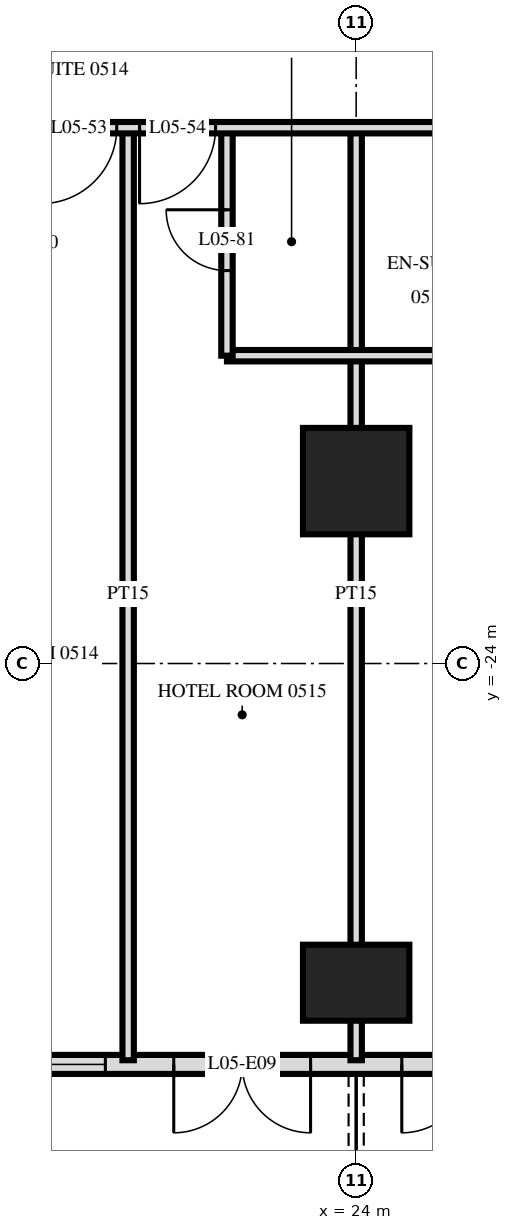
"""IFC4 building model, lengths in metres.
Left out: names, types, materials, properties, quantities, classifications, styles, units other than length and angle.
Written with IfcOpenShell. Run it as: python <this file> out.ifc"""

import sys

from ifc_helpers import new_model, si_unit, direction, frame, frame_2d, origin, origin_2d, place, context, subcontext, project, spatial, rectangle, extrude, element, fill, save


model = new_model("IFC4")
c1 = context("Model", 3, precision=1e-05, world=origin(), true_north=direction((0.0, 1.0)))
c2 = subcontext(c1, "Body", "Model", "MODEL_VIEW")
j1 = project(units=[si_unit("LENGTHUNIT", "METRE"), si_unit("PLANEANGLEUNIT", "RADIAN")], contexts=[c1])
p1 = place(None, origin())
s1 = spatial("IfcSite", under=j1, at=p1, CompositionType="ELEMENT")
p2 = place(p1, origin())
s2 = spatial("IfcBuilding", under=s1, at=p2, CompositionType="ELEMENT")
p3 = place(p2, frame((0.0, 0.0, 27.6)))
s3 = spatial("IfcBuildingStorey", under=s2, at=p3, CompositionType="ELEMENT", Elevation=27.6)
p4 = place(p3, frame((24.0, -28.2, 0.0), z_axis=(0.0, 0.0, 1.0), x_axis=(1.0, 0.0, 0.0)))
e1 = element("IfcColumn", 1, at=p4, inside=s3, PredefinedType="COLUMN", context=c2, shape_type="SweptSolid", body=[
    extrude(rectangle(XDim=1.4, YDim=1.0, at=origin_2d()), origin(), (0.0, 0.0, 1.0), 3.6),
])
p5 = place(p3, frame((24.0, -21.6, 0.0), z_axis=(0.0, 0.0, 1.0), x_axis=(1.0, 0.0, 0.0)))
e2 = element("IfcColumn", 2, at=p5, inside=s3, PredefinedType="COLUMN", context=c2, shape_type="SweptSolid", body=[
    extrude(rectangle(XDim=1.4, YDim=1.4, at=origin_2d()), origin(), (0.0, 0.0, 1.0), 3.6),
])
p6 = place(p3, frame((-28.775, -29.275, 0.0), z_axis=(0.0, 0.0, 1.0), x_axis=(1.0, 0.0, 0.0)))
e3 = element("IfcWall", 3, at=p6, inside=s3, PredefinedType="SOLIDWALL", context=c2, shape_type="SweptSolid", body=[
    extrude(rectangle(XDim=57.551, YDim=0.25, at=frame_2d((28.775, 0.0))), origin(), (0.0, 0.0, 1.0), 3.32),
])
p7 = place(p6, frame((0.575, 0.0, 0.0)))
e4 = element("IfcOpeningElement", 4, at=p7, cuts=e3, PredefinedType="OPENING", context=c2, shape_type="SweptSolid", body=[
    extrude(rectangle(XDim=1.8, YDim=2.4, at=frame_2d((0.9, 1.2))), frame((0.0, 0.135, 0.0), z_axis=(0.0, -1.0, 0.0), x_axis=(1.0, 0.0, 0.0)), (0.0, 0.0, 1.0), 0.27),
])
p8 = place(p6, frame((5.375, 0.0, 0.0)))
e5 = element("IfcOpeningElement", 5, at=p8, cuts=e3, PredefinedType="OPENING", context=c2, shape_type="SweptSolid", body=[
    extrude(rectangle(XDim=1.8, YDim=2.4, at=frame_2d((0.9, 1.2))), frame((0.0, 0.135, 0.0), z_axis=(0.0, -1.0, 0.0), x_axis=(1.0, 0.0, 0.0)), (0.0, 0.0, 1.0), 0.27),
])
p9 = place(p6, frame((8.075, 0.0, 0.3)))
e6 = element("IfcOpeningElement", 6, at=p9, cuts=e3, PredefinedType="OPENING", context=c2, shape_type="SweptSolid", body=[
    extrude(rectangle(XDim=2.4, YDim=2.1, at=frame_2d((1.2, 1.05))), frame((0.0, 0.135, 0.0), z_axis=(0.0, -1.0, 0.0), x_axis=(1.0, 0.0, 0.0)), (0.0, 0.0, 1.0), 0.27),
])
p10 = place(p6, frame((11.375, 0.0, 0.0)))
e7 = element("IfcOpeningElement", 7, at=p10, cuts=e3, PredefinedType="OPENING", context=c2, shape_type="SweptSolid", body=[
    extrude(rectangle(XDim=1.8, YDim=2.4, at=frame_2d((0.9, 1.2))), frame((0.0, 0.135, 0.0), z_axis=(0.0, -1.0, 0.0), x_axis=(1.0, 0.0, 0.0)), (0.0, 0.0, 1.0), 0.27),
])
p11 = place(p6, frame((14.075, 0.0, 0.3)))
e8 = element("IfcOpeningElement", 8, at=p11, cuts=e3, PredefinedType="OPENING", context=c2, shape_type="SweptSolid", body=[
    extrude(rectangle(XDim=2.4, YDim=2.1, at=frame_2d((1.2, 1.05))), frame((0.0, 0.135, 0.0), z_axis=(0.0, -1.0, 0.0), x_axis=(1.0, 0.0, 0.0)), (0.0, 0.0, 1.0), 0.27),
])
p12 = place(p6, frame((17.375, 0.0, 0.0)))
e9 = element("IfcOpeningElement", 9, at=p12, cuts=e3, PredefinedType="OPENING", context=c2, shape_type="SweptSolid", body=[
    extrude(rectangle(XDim=1.8, YDim=2.4, at=frame_2d((0.9, 1.2))), frame((0.0, 0.135, 0.0), z_axis=(0.0, -1.0, 0.0), x_axis=(1.0, 0.0, 0.0)), (0.0, 0.0, 1.0), 0.27),
])
p13 = place(p6, frame((20.075, 0.0, 0.3)))
e10 = element("IfcOpeningElement", 10, at=p13, cuts=e3, PredefinedType="OPENING", context=c2, shape_type="SweptSolid", body=[
    extrude(rectangle(XDim=2.4, YDim=2.1, at=frame_2d((1.2, 1.05))), frame((0.0, 0.135, 0.0), z_axis=(0.0, -1.0, 0.0), x_axis=(1.0, 0.0, 0.0)), (0.0, 0.0, 1.0), 0.27),
])
p14 = place(p6, frame((23.075, 0.0, 0.3)))
e11 = element("IfcOpeningElement", 11, at=p14, cuts=e3, PredefinedType="OPENING", context=c2, shape_type="SweptSolid", body=[
    extrude(rectangle(XDim=2.4, YDim=2.1, at=frame_2d((1.2, 1.05))), frame((0.0, 0.135, 0.0), z_axis=(0.0, -1.0, 0.0), x_axis=(1.0, 0.0, 0.0)), (0.0, 0.0, 1.0), 0.27),
])
p15 = place(p6, frame((26.375, 0.0, 0.0)))
e12 = element("IfcOpeningElement", 12, at=p15, cuts=e3, PredefinedType="OPENING", context=c2, shape_type="SweptSolid", body=[
    extrude(rectangle(XDim=1.8, YDim=2.4, at=frame_2d((0.9, 1.2))), frame((0.0, 0.135, 0.0), z_axis=(0.0, -1.0, 0.0), x_axis=(1.0, 0.0, 0.0)), (0.0, 0.0, 1.0), 0.27),
])
p16 = place(p6, frame((29.375, 0.0, 0.0)))
e13 = element("IfcOpeningElement", 13, at=p16, cuts=e3, PredefinedType="OPENING", context=c2, shape_type="SweptSolid", body=[
    extrude(rectangle(XDim=1.8, YDim=2.4, at=frame_2d((0.9, 1.2))), frame((0.0, 0.135, 0.0), z_axis=(0.0, -1.0, 0.0), x_axis=(1.0, 0.0, 0.0)), (0.0, 0.0, 1.0), 0.27),
])
p17 = place(p6, frame((32.075, 0.0, 0.3)))
e14 = element("IfcOpeningElement", 14, at=p17, cuts=e3, PredefinedType="OPENING", context=c2, shape_type="SweptSolid", body=[
    extrude(rectangle(XDim=2.4, YDim=2.1, at=frame_2d((1.2, 1.05))), frame((0.0, 0.135, 0.0), z_axis=(0.0, -1.0, 0.0), x_axis=(1.0, 0.0, 0.0)), (0.0, 0.0, 1.0), 0.27),
])
p18 = place(p6, frame((35.375, 0.0, 0.0)))
e15 = element("IfcOpeningElement", 15, at=p18, cuts=e3, PredefinedType="OPENING", context=c2, shape_type="SweptSolid", body=[
    extrude(rectangle(XDim=1.8, YDim=2.4, at=frame_2d((0.9, 1.2))), frame((0.0, 0.135, 0.0), z_axis=(0.0, -1.0, 0.0), x_axis=(1.0, 0.0, 0.0)), (0.0, 0.0, 1.0), 0.27),
])
p19 = place(p6, frame((38.075, 0.0, 0.3)))
e16 = element("IfcOpeningElement", 16, at=p19, cuts=e3, PredefinedType="OPENING", context=c2, shape_type="SweptSolid", body=[
    extrude(rectangle(XDim=2.4, YDim=2.1, at=frame_2d((1.2, 1.05))), frame((0.0, 0.135, 0.0), z_axis=(0.0, -1.0, 0.0), x_axis=(1.0, 0.0, 0.0)), (0.0, 0.0, 1.0), 0.27),
])
p20 = place(p6, frame((41.375, 0.0, 0.0)))
e17 = element("IfcOpeningElement", 17, at=p20, cuts=e3, PredefinedType="OPENING", context=c2, shape_type="SweptSolid", body=[
    extrude(rectangle(XDim=1.8, YDim=2.4, at=frame_2d((0.9, 1.2))), frame((0.0, 0.135, 0.0), z_axis=(0.0, -1.0, 0.0), x_axis=(1.0, 0.0, 0.0)), (0.0, 0.0, 1.0), 0.27),
])
p21 = place(p6, frame((44.075, 0.0, 0.3)))
e18 = element("IfcOpeningElement", 18, at=p21, cuts=e3, PredefinedType="OPENING", context=c2, shape_type="SweptSolid", body=[
    extrude(rectangle(XDim=2.4, YDim=2.1, at=frame_2d((1.2, 1.05))), frame((0.0, 0.135, 0.0), z_axis=(0.0, -1.0, 0.0), x_axis=(1.0, 0.0, 0.0)), (0.0, 0.0, 1.0), 0.27),
])
p22 = place(p6, frame((47.075, 0.0, 0.3)))
e19 = element("IfcOpeningElement", 19, at=p22, cuts=e3, PredefinedType="OPENING", context=c2, shape_type="SweptSolid", body=[
    extrude(rectangle(XDim=2.4, YDim=2.1, at=frame_2d((1.2, 1.05))), frame((0.0, 0.135, 0.0), z_axis=(0.0, -1.0, 0.0), x_axis=(1.0, 0.0, 0.0)), (0.0, 0.0, 1.0), 0.27),
])
p23 = place(p6, frame((50.375, 0.0, 0.0)))
e20 = element("IfcOpeningElement", 20, at=p23, cuts=e3, PredefinedType="OPENING", context=c2, shape_type="SweptSolid", body=[
    extrude(rectangle(XDim=1.8, YDim=2.4, at=frame_2d((0.9, 1.2))), frame((0.0, 0.135, 0.0), z_axis=(0.0, -1.0, 0.0), x_axis=(1.0, 0.0, 0.0)), (0.0, 0.0, 1.0), 0.27),
])
p24 = place(p6, frame((53.375, 0.0, 0.0)))
e21 = element("IfcOpeningElement", 21, at=p24, cuts=e3, PredefinedType="OPENING", context=c2, shape_type="SweptSolid", body=[
    extrude(rectangle(XDim=1.8, YDim=2.4, at=frame_2d((0.9, 1.2))), frame((0.0, 0.135, 0.0), z_axis=(0.0, -1.0, 0.0), x_axis=(1.0, 0.0, 0.0)), (0.0, 0.0, 1.0), 0.27),
])
p25 = place(p3, frame((24.0, -29.22, 0.0), z_axis=(0.0, 0.0, 1.0), x_axis=(0.0, 1.0, 0.0)))
e22 = element("IfcWall", 22, at=p25, inside=s3, PredefinedType="PARTITIONING", context=c2, shape_type="SweptSolid", body=[
    extrude(rectangle(XDim=12.27, YDim=0.15, at=frame_2d((6.135, 0.0))), origin(), (0.0, 0.0, 1.0), 3.32),
])
p26 = place(p3, frame((22.3, -19.95, 0.0), z_axis=(0.0, 0.0, 1.0), x_axis=(0.0, 1.0, 0.0)))
e23 = element("IfcWall", 23, at=p26, inside=s3, PredefinedType="PARTITIONING", context=c2, shape_type="SweptSolid", body=[
    extrude(rectangle(XDim=3.0, YDim=0.15, at=frame_2d((1.5, 0.0))), origin(), (0.0, 0.0, 1.0), 3.32),
])
p27 = place(p26, frame((1.12, 0.0, 0.0)))
e24 = element("IfcOpeningElement", 24, at=p27, cuts=e23, PredefinedType="OPENING", context=c2, shape_type="SweptSolid", body=[
    extrude(rectangle(XDim=0.8, YDim=2.1, at=frame_2d((0.4, 1.05))), frame((0.0, 0.085, 0.0), z_axis=(0.0, -1.0, 0.0), x_axis=(1.0, 0.0, 0.0)), (0.0, 0.0, 1.0), 0.17),
])
p28 = place(p3, frame((21.0, -29.22, 0.0), z_axis=(0.0, 0.0, 1.0), x_axis=(0.0, 1.0, 0.0)))
e25 = element("IfcWall", 25, at=p28, inside=s3, PredefinedType="PARTITIONING", context=c2, shape_type="SweptSolid", body=[
    extrude(rectangle(XDim=12.27, YDim=0.15, at=frame_2d((6.135, 0.0))), origin(), (0.0, 0.0, 1.0), 3.32),
])
p29 = place(p3, frame((22.3, -19.95, 0.0), z_axis=(0.0, 0.0, 1.0), x_axis=(1.0, 0.0, 0.0)))
e26 = element("IfcWall", 26, at=p29, inside=s3, PredefinedType="PARTITIONING", context=c2, shape_type="SweptSolid", body=[
    extrude(rectangle(XDim=4.7, YDim=0.15, at=frame_2d((2.35, 0.0))), origin(), (0.0, 0.0, 1.0), 3.32),
])
p30 = place(p3, frame((-33.12, -16.95, 0.0), z_axis=(0.0, 0.0, 1.0), x_axis=(1.0, 0.0, 0.0)))
e27 = element("IfcWall", 27, at=p30, inside=s3, PredefinedType="PARTITIONING", context=c2, shape_type="SweptSolid", body=[
    extrude(rectangle(XDim=66.24, YDim=0.15, at=frame_2d((33.12, 0.0))), origin(), (0.0, 0.0, 1.0), 3.32),
])
p31 = place(p30, frame((9.27, 0.0, 0.0)))
e28 = element("IfcOpeningElement", 28, at=p31, cuts=e27, PredefinedType="OPENING", context=c2, shape_type="SweptSolid", body=[
    extrude(rectangle(XDim=1.0, YDim=2.1, at=frame_2d((0.5, 1.05))), frame((0.0, 0.085, 0.0), z_axis=(0.0, -1.0, 0.0), x_axis=(1.0, 0.0, 0.0)), (0.0, 0.0, 1.0), 0.17),
])
p32 = place(p30, frame((13.97, 0.0, 0.0)))
e29 = element("IfcOpeningElement", 29, at=p32, cuts=e27, PredefinedType="OPENING", context=c2, shape_type="SweptSolid", body=[
    extrude(rectangle(XDim=1.0, YDim=2.1, at=frame_2d((0.5, 1.05))), frame((0.0, 0.085, 0.0), z_axis=(0.0, -1.0, 0.0), x_axis=(1.0, 0.0, 0.0)), (0.0, 0.0, 1.0), 0.17),
])
p33 = place(p30, frame((15.27, 0.0, 0.0)))
e30 = element("IfcOpeningElement", 30, at=p33, cuts=e27, PredefinedType="OPENING", context=c2, shape_type="SweptSolid", body=[
    extrude(rectangle(XDim=1.0, YDim=2.1, at=frame_2d((0.5, 1.05))), frame((0.0, 0.085, 0.0), z_axis=(0.0, -1.0, 0.0), x_axis=(1.0, 0.0, 0.0)), (0.0, 0.0, 1.0), 0.17),
])
p34 = place(p30, frame((19.97, 0.0, 0.0)))
e31 = element("IfcOpeningElement", 31, at=p34, cuts=e27, PredefinedType="OPENING", context=c2, shape_type="SweptSolid", body=[
    extrude(rectangle(XDim=1.0, YDim=2.1, at=frame_2d((0.5, 1.05))), frame((0.0, 0.085, 0.0), z_axis=(0.0, -1.0, 0.0), x_axis=(1.0, 0.0, 0.0)), (0.0, 0.0, 1.0), 0.17),
])
p35 = place(p30, frame((22.27, 0.0, 0.0)))
e32 = element("IfcOpeningElement", 32, at=p35, cuts=e27, PredefinedType="OPENING", context=c2, shape_type="SweptSolid", body=[
    extrude(rectangle(XDim=1.0, YDim=2.1, at=frame_2d((0.5, 1.05))), frame((0.0, 0.085, 0.0), z_axis=(0.0, -1.0, 0.0), x_axis=(1.0, 0.0, 0.0)), (0.0, 0.0, 1.0), 0.17),
])
p36 = place(p30, frame((28.97, 0.0, 0.0)))
e33 = element("IfcOpeningElement", 33, at=p36, cuts=e27, PredefinedType="OPENING", context=c2, shape_type="SweptSolid", body=[
    extrude(rectangle(XDim=1.0, YDim=2.1, at=frame_2d((0.5, 1.05))), frame((0.0, 0.085, 0.0), z_axis=(0.0, -1.0, 0.0), x_axis=(1.0, 0.0, 0.0)), (0.0, 0.0, 1.0), 0.17),
])
p37 = place(p30, frame((30.27, 0.0, 0.0)))
e34 = element("IfcOpeningElement", 34, at=p37, cuts=e27, PredefinedType="OPENING", context=c2, shape_type="SweptSolid", body=[
    extrude(rectangle(XDim=1.0, YDim=2.1, at=frame_2d((0.5, 1.05))), frame((0.0, 0.085, 0.0), z_axis=(0.0, -1.0, 0.0), x_axis=(1.0, 0.0, 0.0)), (0.0, 0.0, 1.0), 0.17),
])
p38 = place(p30, frame((34.97, 0.0, 0.0)))
e35 = element("IfcOpeningElement", 35, at=p38, cuts=e27, PredefinedType="OPENING", context=c2, shape_type="SweptSolid", body=[
    extrude(rectangle(XDim=1.0, YDim=2.1, at=frame_2d((0.5, 1.05))), frame((0.0, 0.085, 0.0), z_axis=(0.0, -1.0, 0.0), x_axis=(1.0, 0.0, 0.0)), (0.0, 0.0, 1.0), 0.17),
])
p39 = place(p30, frame((36.27, 0.0, 0.0)))
e36 = element("IfcOpeningElement", 36, at=p39, cuts=e27, PredefinedType="OPENING", context=c2, shape_type="SweptSolid", body=[
    extrude(rectangle(XDim=1.0, YDim=2.1, at=frame_2d((0.5, 1.05))), frame((0.0, 0.085, 0.0), z_axis=(0.0, -1.0, 0.0), x_axis=(1.0, 0.0, 0.0)), (0.0, 0.0, 1.0), 0.17),
])
p40 = place(p30, frame((40.97, 0.0, 0.0)))
e37 = element("IfcOpeningElement", 37, at=p40, cuts=e27, PredefinedType="OPENING", context=c2, shape_type="SweptSolid", body=[
    extrude(rectangle(XDim=1.0, YDim=2.1, at=frame_2d((0.5, 1.05))), frame((0.0, 0.085, 0.0), z_axis=(0.0, -1.0, 0.0), x_axis=(1.0, 0.0, 0.0)), (0.0, 0.0, 1.0), 0.17),
])
p41 = place(p30, frame((42.27, 0.0, 0.0)))
e38 = element("IfcOpeningElement", 38, at=p41, cuts=e27, PredefinedType="OPENING", context=c2, shape_type="SweptSolid", body=[
    extrude(rectangle(XDim=1.0, YDim=2.1, at=frame_2d((0.5, 1.05))), frame((0.0, 0.085, 0.0), z_axis=(0.0, -1.0, 0.0), x_axis=(1.0, 0.0, 0.0)), (0.0, 0.0, 1.0), 0.17),
])
p42 = place(p30, frame((46.97, 0.0, 0.0)))
e39 = element("IfcOpeningElement", 39, at=p42, cuts=e27, PredefinedType="OPENING", context=c2, shape_type="SweptSolid", body=[
    extrude(rectangle(XDim=1.0, YDim=2.1, at=frame_2d((0.5, 1.05))), frame((0.0, 0.085, 0.0), z_axis=(0.0, -1.0, 0.0), x_axis=(1.0, 0.0, 0.0)), (0.0, 0.0, 1.0), 0.17),
])
p43 = place(p30, frame((48.27, 0.0, 0.0)))
e40 = element("IfcOpeningElement", 40, at=p43, cuts=e27, PredefinedType="OPENING", context=c2, shape_type="SweptSolid", body=[
    extrude(rectangle(XDim=1.0, YDim=2.1, at=frame_2d((0.5, 1.05))), frame((0.0, 0.085, 0.0), z_axis=(0.0, -1.0, 0.0), x_axis=(1.0, 0.0, 0.0)), (0.0, 0.0, 1.0), 0.17),
])
p44 = place(p30, frame((52.97, 0.0, 0.0)))
e41 = element("IfcOpeningElement", 41, at=p44, cuts=e27, PredefinedType="OPENING", context=c2, shape_type="SweptSolid", body=[
    extrude(rectangle(XDim=1.0, YDim=2.1, at=frame_2d((0.5, 1.05))), frame((0.0, 0.085, 0.0), z_axis=(0.0, -1.0, 0.0), x_axis=(1.0, 0.0, 0.0)), (0.0, 0.0, 1.0), 0.17),
])
p45 = place(p30, frame((54.27, 0.0, 0.0)))
e42 = element("IfcOpeningElement", 42, at=p45, cuts=e27, PredefinedType="OPENING", context=c2, shape_type="SweptSolid", body=[
    extrude(rectangle(XDim=1.0, YDim=2.1, at=frame_2d((0.5, 1.05))), frame((0.0, 0.085, 0.0), z_axis=(0.0, -1.0, 0.0), x_axis=(1.0, 0.0, 0.0)), (0.0, 0.0, 1.0), 0.17),
])
p46 = place(p30, frame((4.4, 0.0, 0.0)))
e43 = element("IfcOpeningElement", 43, at=p46, cuts=e27, PredefinedType="OPENING", context=c2, shape_type="SweptSolid", body=[
    extrude(rectangle(XDim=1.0, YDim=2.1, at=frame_2d((0.5, 1.05))), frame((0.0, 0.085, 0.0), z_axis=(0.0, -1.0, 0.0), x_axis=(1.0, 0.0, 0.0)), (0.0, 0.0, 1.0), 0.17),
])
p47 = place(p30, frame((60.8, 0.0, 0.0)))
e44 = element("IfcOpeningElement", 44, at=p47, cuts=e27, PredefinedType="OPENING", context=c2, shape_type="SweptSolid", body=[
    extrude(rectangle(XDim=1.0, YDim=2.1, at=frame_2d((0.5, 1.05))), frame((0.0, 0.085, 0.0), z_axis=(0.0, -1.0, 0.0), x_axis=(1.0, 0.0, 0.0)), (0.0, 0.0, 1.0), 0.17),
])
p48 = place(p22, origin())
e45 = element("IfcWindow", 45, at=p48, inside=s3, PartitioningType="SINGLE_PANEL", PredefinedType="WINDOW", context=c2, shape_type="SweptSolid", body=[
    extrude(rectangle(XDim=2.4, YDim=2.1, at=frame_2d((1.2, 1.05))), frame((0.0, 0.03, 0.0), z_axis=(0.0, -1.0, 0.0), x_axis=(1.0, 0.0, 0.0)), (0.0, 0.0, 1.0), 0.06),
])
fill(e19, e45)
p49 = place(p23, frame((0.9, 0.0, 0.0), z_axis=(0.0, 0.0, 1.0), x_axis=(-1.0, 0.0, 0.0)))
e46 = element("IfcDoor", 46, at=p49, inside=s3, OperationType="DOUBLE_DOOR_SINGLE_SWING", PredefinedType="DOOR", context=c2, shape_type="SweptSolid", body=[
    extrude(rectangle(XDim=1.8, YDim=2.4, at=frame_2d((0.0, 1.2))), frame((0.0, -0.025, 0.0), z_axis=(0.0, 1.0, 0.0), x_axis=(-1.0, 0.0, 0.0)), (0.0, 0.0, 1.0), 0.05),
])
fill(e20, e46)
p50 = place(p24, frame((0.9, 0.0, 0.0), z_axis=(0.0, 0.0, 1.0), x_axis=(-1.0, 0.0, 0.0)))
e47 = element("IfcDoor", 47, at=p50, inside=s3, OperationType="DOUBLE_DOOR_SINGLE_SWING", PredefinedType="DOOR", context=c2, shape_type="SweptSolid", body=[
    extrude(rectangle(XDim=1.8, YDim=2.4, at=frame_2d((0.0, 1.2))), frame((0.0, -0.025, 0.0), z_axis=(0.0, 1.0, 0.0), x_axis=(-1.0, 0.0, 0.0)), (0.0, 0.0, 1.0), 0.05),
])
fill(e21, e47)
p51 = place(p44, frame((0.5, 0.0, 0.0), z_axis=(0.0, 0.0, 1.0), x_axis=(-1.0, 0.0, 0.0)))
e48 = element("IfcDoor", 48, at=p51, inside=s3, OperationType="SINGLE_SWING_LEFT", PredefinedType="DOOR", context=c2, shape_type="SweptSolid", body=[
    extrude(rectangle(XDim=1.0, YDim=2.1, at=frame_2d((0.0, 1.05))), frame((0.0, -0.025, 0.0), z_axis=(0.0, 1.0, 0.0), x_axis=(-1.0, 0.0, 0.0)), (0.0, 0.0, 1.0), 0.05),
])
fill(e41, e48)
p52 = place(p45, frame((0.5, 0.0, 0.0), z_axis=(0.0, 0.0, 1.0), x_axis=(-1.0, 0.0, 0.0)))
e49 = element("IfcDoor", 49, at=p52, inside=s3, OperationType="SINGLE_SWING_LEFT", PredefinedType="DOOR", context=c2, shape_type="SweptSolid", body=[
    extrude(rectangle(XDim=1.0, YDim=2.1, at=frame_2d((0.0, 1.05))), frame((0.0, -0.025, 0.0), z_axis=(0.0, 1.0, 0.0), x_axis=(-1.0, 0.0, 0.0)), (0.0, 0.0, 1.0), 0.05),
])
fill(e42, e49)
p53 = place(p27, origin())
e50 = element("IfcDoor", 50, at=p53, inside=s3, OperationType="SINGLE_SWING_LEFT", PredefinedType="DOOR", context=c2, shape_type="SweptSolid", body=[
    extrude(rectangle(XDim=0.8, YDim=2.1, at=frame_2d((0.4, 1.05))), frame((0.0, 0.025, 0.0), z_axis=(0.0, -1.0, 0.0), x_axis=(1.0, 0.0, 0.0)), (0.0, 0.0, 1.0), 0.05),
])
fill(e24, e50)
save(model, sys.argv[1])
